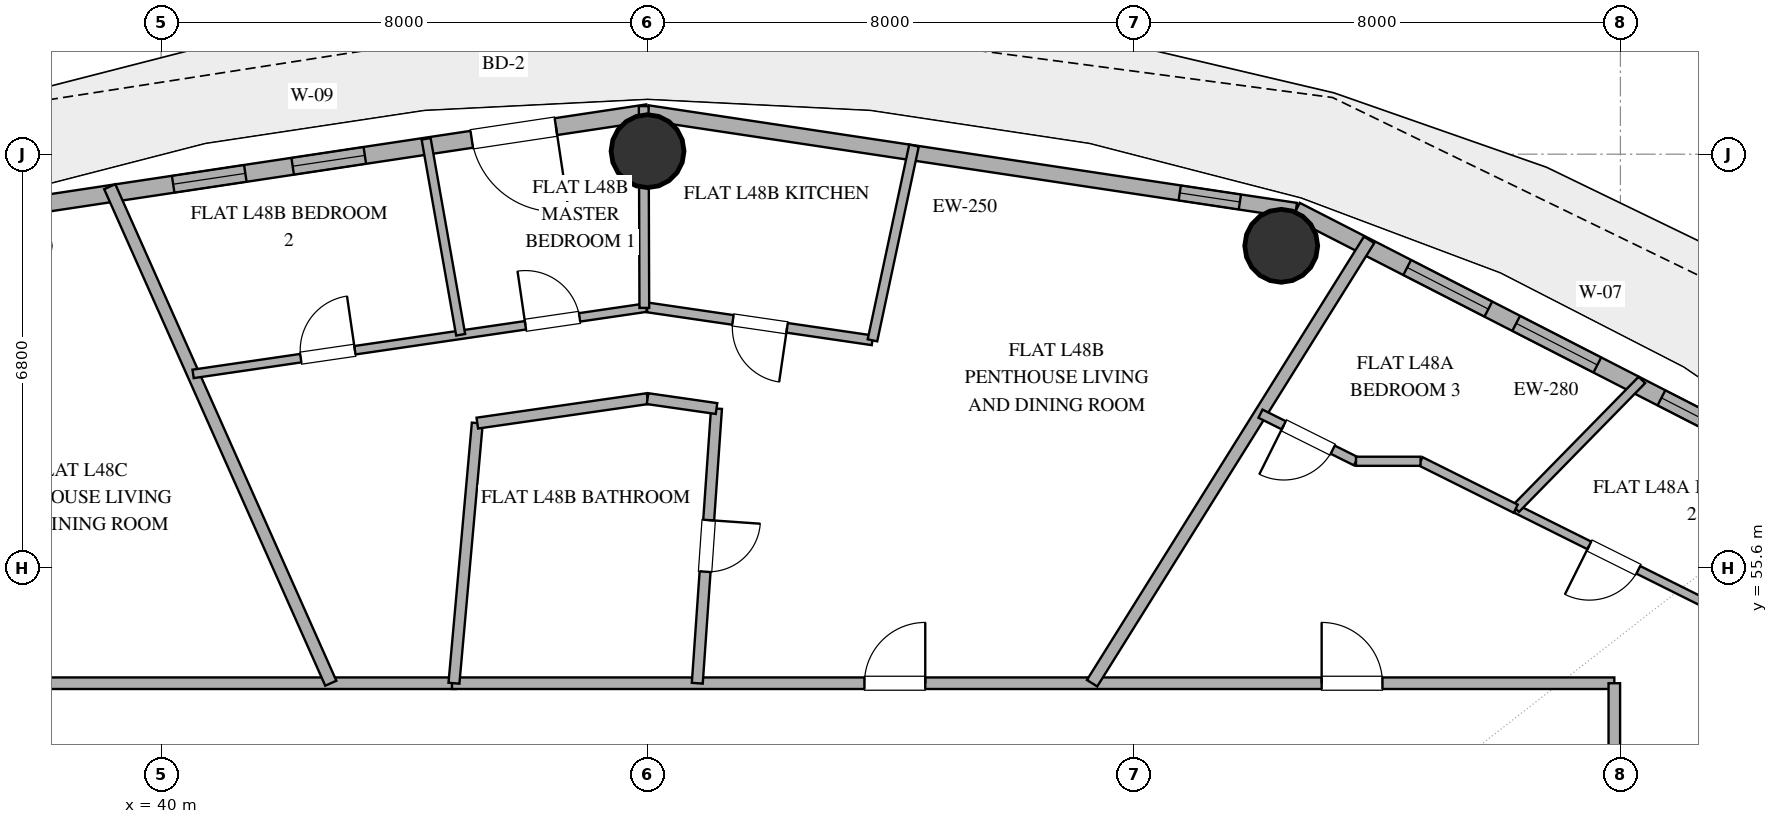
"""IFC4 building model, lengths in metres.
Left out: names, types, materials, properties, quantities, classifications, styles, units other than length and angle.
Written with IfcOpenShell. Run it as: python <this file> out.ifc"""

import sys

from ifc_helpers import new_model, si_unit, direction, frame, frame_2d, origin, origin_2d, place, context, subcontext, project, spatial, rectangle, hollow_circle, extrude, element, fill, save


model = new_model("IFC4")
c1 = context("Model", 3, precision=1e-05, world=origin(), true_north=direction((0.0, 1.0)))
c2 = subcontext(c1, "Body", "Model", "MODEL_VIEW")
j1 = project(units=[si_unit("LENGTHUNIT", "METRE"), si_unit("PLANEANGLEUNIT", "RADIAN")], contexts=[c1])
p1 = place(None, origin())
s1 = spatial("IfcSite", under=j1, at=p1, CompositionType="ELEMENT")
p2 = place(p1, origin())
s2 = spatial("IfcBuilding", under=s1, at=p2, CompositionType="ELEMENT")
p3 = place(p2, frame((0.0, 0.0, 190.2)))
s3 = spatial("IfcBuildingStorey", under=s2, at=p3, CompositionType="ELEMENT", Elevation=190.2)
for number, where, z_axis, x_axis in (
    (1, (58.422, 60.893, 0.0), (0.0, 0.0, 1.0), (1.0, 0.0, 0.0)),
    (2, (48.0, 62.45, 0.0), (0.0, 0.0, 1.0), (1.0, 0.0, 0.0)),
):
    element("IfcColumn", number, at=place(p3, frame(where, z_axis=z_axis, x_axis=x_axis)), inside=s3, PredefinedType="COLUMN", context=c2, shape_type="SweptSolid", body=[
        extrude(hollow_circle(Radius=0.6, WallThickness=0.032, at=origin_2d()), origin(), (0.0, 0.0, 1.0), 3.38),
    ])
p4 = place(p3, frame((67.576, 56.906, 0.0), z_axis=(0.0, 0.0, 1.0), x_axis=(-0.889872523182, 0.456209263919, 0.0)))
e3 = element("IfcWall", 3, at=p4, inside=s3, PredefinedType="SOLIDWALL", context=c2, shape_type="SweptSolid", body=[
    extrude(rectangle(XDim=10.016, YDim=0.28, at=frame_2d((5.008, 0.0))), origin(), (0.0, 0.0, 1.0), 3.38),
])
p5 = place(p4, frame((1.76, 0.0, 0.85)))
e4 = element("IfcOpeningElement", 4, at=p5, cuts=e3, PredefinedType="OPENING", context=c2, shape_type="SweptSolid", body=[
    extrude(rectangle(XDim=1.5, YDim=2.0, at=frame_2d((0.75, 1.0))), frame((0.0, 0.15, 0.0), z_axis=(0.0, -1.0, 0.0), x_axis=(1.0, 0.0, 0.0)), (0.0, 0.0, 1.0), 0.3),
])
p6 = place(p4, frame((4.445, 0.0, 0.85)))
e5 = element("IfcOpeningElement", 5, at=p6, cuts=e3, PredefinedType="OPENING", context=c2, shape_type="SweptSolid", body=[
    extrude(rectangle(XDim=1.5, YDim=1.8, at=frame_2d((0.75, 0.9))), frame((0.0, 0.15, 0.0), z_axis=(0.0, -1.0, 0.0), x_axis=(1.0, 0.0, 0.0)), (0.0, 0.0, 1.0), 0.3),
])
p7 = place(p4, frame((6.459, 0.0, 0.85)))
e6 = element("IfcOpeningElement", 6, at=p7, cuts=e3, PredefinedType="OPENING", context=c2, shape_type="SweptSolid", body=[
    extrude(rectangle(XDim=1.5, YDim=1.8, at=frame_2d((0.75, 0.9))), frame((0.0, 0.15, 0.0), z_axis=(0.0, -1.0, 0.0), x_axis=(1.0, 0.0, 0.0)), (0.0, 0.0, 1.0), 0.3),
])
p8 = place(p3, frame((58.663, 61.475, 0.0), z_axis=(0.0, 0.0, 1.0), x_axis=(-0.988863993413, 0.148822049884, 0.0)))
e7 = element("IfcWall", 7, at=p8, inside=s3, PredefinedType="SOLIDWALL", context=c2, shape_type="SweptSolid", body=[
    extrude(rectangle(XDim=10.783, YDim=0.25, at=frame_2d((5.392, 0.0))), origin(), (0.0, 0.0, 1.0), 3.38),
])
p9 = place(p8, frame((0.932, 0.0, 1.42)))
e8 = element("IfcOpeningElement", 8, at=p9, cuts=e7, PredefinedType="OPENING", context=c2, shape_type="SweptSolid", body=[
    extrude(rectangle(XDim=1.0, YDim=1.05, at=frame_2d((0.5, 0.525))), frame((0.0, 0.135, 0.0), z_axis=(0.0, -1.0, 0.0), x_axis=(1.0, 0.0, 0.0)), (0.0, 0.0, 1.0), 0.27),
])
p10 = place(p3, frame((48.0, 63.08, 0.0), z_axis=(0.0, 0.0, 1.0), x_axis=(-0.988863993413, -0.148822049884, 0.0)))
e9 = element("IfcWall", 9, at=p10, inside=s3, PredefinedType="SOLIDWALL", context=c2, shape_type="SweptSolid", body=[
    extrude(rectangle(XDim=10.783, YDim=0.28, at=frame_2d((5.392, 0.0))), origin(), (0.0, 0.0, 1.0), 3.38),
])
p11 = place(p10, frame((1.524, 0.0, 0.0)))
e10 = element("IfcOpeningElement", 10, at=p11, cuts=e9, PredefinedType="OPENING", context=c2, shape_type="SweptSolid", body=[
    extrude(rectangle(XDim=1.4, YDim=2.2, at=frame_2d((0.7, 1.1))), frame((0.0, 0.15, 0.0), z_axis=(0.0, -1.0, 0.0), x_axis=(1.0, 0.0, 0.0)), (0.0, 0.0, 1.0), 0.3),
])
p12 = place(p10, frame((4.702, 0.0, 0.85)))
e11 = element("IfcOpeningElement", 11, at=p12, cuts=e9, PredefinedType="OPENING", context=c2, shape_type="SweptSolid", body=[
    extrude(rectangle(XDim=1.2, YDim=1.8, at=frame_2d((0.6, 0.9))), frame((0.0, 0.15, 0.0), z_axis=(0.0, -1.0, 0.0), x_axis=(1.0, 0.0, 0.0)), (0.0, 0.0, 1.0), 0.3),
])
p13 = place(p10, frame((6.69, 0.0, 0.85)))
e12 = element("IfcOpeningElement", 12, at=p13, cuts=e9, PredefinedType="OPENING", context=c2, shape_type="SweptSolid", body=[
    extrude(rectangle(XDim=1.2, YDim=1.8, at=frame_2d((0.6, 0.9))), frame((0.0, 0.15, 0.0), z_axis=(0.0, -1.0, 0.0), x_axis=(1.0, 0.0, 0.0)), (0.0, 0.0, 1.0), 0.3),
])
p14 = place(p3, frame((32.1, 53.7, 0.0), z_axis=(0.0, 0.0, 1.0), x_axis=(1.0, 0.0, 0.0)))
e13 = element("IfcWall", 13, at=p14, inside=s3, PredefinedType="PARTITIONING", context=c2, shape_type="SweptSolid", body=[
    extrude(rectangle(XDim=12.748, YDim=0.19, at=frame_2d((6.374, 0.0))), origin(), (0.0, 0.0, 1.0), 2.74),
])
p15 = place(p14, frame((4.863, 0.0, 0.0)))
e14 = element("IfcOpeningElement", 14, at=p15, cuts=e13, PredefinedType="OPENING", context=c2, shape_type="SweptSolid", body=[
    extrude(rectangle(XDim=1.0, YDim=2.2, at=frame_2d((0.5, 1.1))), frame((0.0, 0.105, 0.0), z_axis=(0.0, -1.0, 0.0), x_axis=(1.0, 0.0, 0.0)), (0.0, 0.0, 1.0), 0.21),
])
p16 = place(p3, frame((44.784, 53.7, 0.0), z_axis=(0.0, 0.0, 1.0), x_axis=(1.0, 0.0, 0.0)))
e15 = element("IfcWall", 15, at=p16, inside=s3, PredefinedType="PARTITIONING", context=c2, shape_type="SweptSolid", body=[
    extrude(rectangle(XDim=19.116, YDim=0.19, at=frame_2d((9.558, 0.0))), origin(), (0.0, 0.0, 1.0), 2.74),
])
p17 = place(p16, frame((14.302, 0.0, 0.0)))
e16 = element("IfcOpeningElement", 16, at=p17, cuts=e15, PredefinedType="OPENING", context=c2, shape_type="SweptSolid", body=[
    extrude(rectangle(XDim=1.0, YDim=2.2, at=frame_2d((0.5, 1.1))), frame((0.0, 0.105, 0.0), z_axis=(0.0, -1.0, 0.0), x_axis=(1.0, 0.0, 0.0)), (0.0, 0.0, 1.0), 0.21),
])
p18 = place(p16, frame((6.783, 0.0, 0.0)))
e17 = element("IfcOpeningElement", 17, at=p18, cuts=e15, PredefinedType="OPENING", context=c2, shape_type="SweptSolid", body=[
    extrude(rectangle(XDim=1.0, YDim=2.2, at=frame_2d((0.5, 1.1))), frame((0.0, 0.105, 0.0), z_axis=(0.0, -1.0, 0.0), x_axis=(1.0, 0.0, 0.0)), (0.0, 0.0, 1.0), 0.21),
])
p19 = place(p3, frame((63.9, 53.7, 0.0), z_axis=(0.0, 0.0, 1.0), x_axis=(0.0, -1.0, 0.0)))
e18 = element("IfcWall", 18, at=p19, inside=s3, PredefinedType="PARTITIONING", context=c2, shape_type="SweptSolid", body=[
    extrude(rectangle(XDim=6.931, YDim=0.19, at=frame_2d((3.465, 0.0))), origin(), (0.0, 0.0, 1.0), 2.74),
])
p20 = place(p3, frame((42.791, 53.7, 0.0), z_axis=(0.0, 0.0, 1.0), x_axis=(-0.406736436421, 0.913545549651, 0.0)))
e19 = element("IfcWall", 19, at=p20, inside=s3, PredefinedType="PARTITIONING", context=c2, shape_type="SweptSolid", body=[
    extrude(rectangle(XDim=8.939, YDim=0.2, at=frame_2d((4.469, 0.0))), origin(), (0.0, 0.0, 1.0), 2.74),
])
p21 = place(p3, frame((55.311, 53.7, 0.0), z_axis=(0.0, 0.0, 1.0), x_axis=(0.529914717401, 0.848050937315, 0.0)))
e20 = element("IfcWall", 20, at=p21, inside=s3, PredefinedType="PARTITIONING", context=c2, shape_type="SweptSolid", body=[
    extrude(rectangle(XDim=8.599, YDim=0.2, at=frame_2d((4.299, 0.0))), origin(), (0.0, 0.0, 1.0), 2.74),
])
p22 = place(p3, frame((49.134, 58.217, 0.0), z_axis=(0.0, 0.0, 1.0), x_axis=(-0.069767962458, -0.997563246824, 0.0)))
e21 = element("IfcWall", 21, at=p22, inside=s3, PredefinedType="PLUMBINGWALL", context=c2, shape_type="SweptSolid", body=[
    extrude(rectangle(XDim=4.528, YDim=0.18, at=frame_2d((2.264, 0.0))), origin(), (0.0, 0.0, 1.0), 2.74),
])
p23 = place(p22, frame((1.839, 0.0, 0.0)))
e22 = element("IfcOpeningElement", 22, at=p23, cuts=e21, PredefinedType="OPENING", context=c2, shape_type="SweptSolid", body=[
    extrude(rectangle(XDim=0.85, YDim=2.1, at=frame_2d((0.425, 1.05))), frame((0.0, 0.1, 0.0), z_axis=(0.0, -1.0, 0.0), x_axis=(1.0, 0.0, 0.0)), (0.0, 0.0, 1.0), 0.2),
])
p24 = place(p3, frame((40.526, 58.787, 0.0), z_axis=(0.0, 0.0, 1.0), x_axis=(0.989472726968, 0.144719461672, 0.0)))
e23 = element("IfcWall", 23, at=p24, inside=s3, PredefinedType="PARTITIONING", context=c2, shape_type="SweptSolid", body=[
    extrude(rectangle(XDim=7.532, YDim=0.14, at=frame_2d((3.766, 0.0))), origin(), (0.0, 0.0, 1.0), 2.74),
])
p25 = place(p24, frame((1.79, 0.0, 0.0)))
e24 = element("IfcOpeningElement", 24, at=p25, cuts=e23, PredefinedType="OPENING", context=c2, shape_type="SweptSolid", body=[
    extrude(rectangle(XDim=0.9, YDim=2.1, at=frame_2d((0.45, 1.05))), frame((0.0, 0.08, 0.0), z_axis=(0.0, -1.0, 0.0), x_axis=(1.0, 0.0, 0.0)), (0.0, 0.0, 1.0), 0.16),
])
p26 = place(p24, frame((5.524, 0.0, 0.0)))
e25 = element("IfcOpeningElement", 25, at=p26, cuts=e23, PredefinedType="OPENING", context=c2, shape_type="SweptSolid", body=[
    extrude(rectangle(XDim=0.9, YDim=2.1, at=frame_2d((0.45, 1.05))), frame((0.0, 0.08, 0.0), z_axis=(0.0, -1.0, 0.0), x_axis=(1.0, 0.0, 0.0)), (0.0, 0.0, 1.0), 0.16),
])
p27 = place(p3, frame((44.816, 53.7, 0.0), z_axis=(0.0, 0.0, 1.0), x_axis=(0.089418344166, 0.995994156472, 0.0)))
e26 = element("IfcWall", 26, at=p27, inside=s3, PredefinedType="PLUMBINGWALL", context=c2, shape_type="SweptSolid", body=[
    extrude(rectangle(XDim=4.295, YDim=0.18, at=frame_2d((2.147, 0.0))), origin(), (0.0, 0.0, 1.0), 2.74),
])
p28 = place(p3, frame((51.699, 59.339, 0.0), z_axis=(0.0, 0.0, 1.0), x_axis=(-0.98948182168, 0.144657265858, 0.0)))
e27 = element("IfcWall", 27, at=p28, inside=s3, PredefinedType="PLUMBINGWALL", context=c2, shape_type="SweptSolid", body=[
    extrude(rectangle(XDim=3.738, YDim=0.16, at=frame_2d((1.869, 0.0))), origin(), (0.0, 0.0, 1.0), 2.74),
])
p29 = place(p28, frame((1.419, 0.0, 0.0)))
e28 = element("IfcOpeningElement", 28, at=p29, cuts=e27, PredefinedType="OPENING", context=c2, shape_type="SweptSolid", body=[
    extrude(rectangle(XDim=0.9, YDim=2.1, at=frame_2d((0.45, 1.05))), frame((0.0, 0.09, 0.0), z_axis=(0.0, -1.0, 0.0), x_axis=(1.0, 0.0, 0.0)), (0.0, 0.0, 1.0), 0.18),
])
p30 = place(p3, frame((65.505, 54.961, 0.0), z_axis=(0.0, 0.0, 1.0), x_axis=(-0.894941244144, 0.4461840086, 0.0)))
e29 = element("IfcWall", 29, at=p30, inside=s3, PredefinedType="PARTITIONING", context=c2, shape_type="SweptSolid", body=[
    extrude(rectangle(XDim=3.605, YDim=0.14, at=frame_2d((1.803, 0.0))), origin(), (0.0, 0.0, 1.0), 2.74),
])
p31 = place(p30, frame((1.353, 0.0, 0.0)))
e30 = element("IfcOpeningElement", 30, at=p31, cuts=e29, PredefinedType="OPENING", context=c2, shape_type="SweptSolid", body=[
    extrude(rectangle(XDim=0.9, YDim=2.1, at=frame_2d((0.45, 1.05))), frame((0.0, 0.08, 0.0), z_axis=(0.0, -1.0, 0.0), x_axis=(1.0, 0.0, 0.0)), (0.0, 0.0, 1.0), 0.16),
])
p32 = place(p3, frame((47.947, 59.872, 0.0), z_axis=(0.0, 0.0, 1.0), x_axis=(-0.003016466559, 0.999995450454, 0.0)))
e31 = element("IfcWall", 31, at=p32, inside=s3, PredefinedType="PLUMBINGWALL", context=c2, shape_type="SweptSolid", body=[
    extrude(rectangle(XDim=3.318, YDim=0.16, at=frame_2d((1.659, 0.0))), origin(), (0.0, 0.0, 1.0), 2.74),
])
p33 = place(p3, frame((52.382, 62.542, 0.0), z_axis=(0.0, 0.0, 1.0), x_axis=(-0.208602341862, -0.97800054344, 0.0)))
e32 = element("IfcWall", 32, at=p33, inside=s3, PredefinedType="PLUMBINGWALL", context=c2, shape_type="SweptSolid", body=[
    extrude(rectangle(XDim=3.275, YDim=0.16, at=frame_2d((1.637, 0.0))), origin(), (0.0, 0.0, 1.0), 2.74),
])
p34 = place(p3, frame((44.927, 59.43, 0.0), z_axis=(0.0, 0.0, 1.0), x_axis=(-0.17359807558, 0.984816586048, 0.0)))
e33 = element("IfcWall", 33, at=p34, inside=s3, PredefinedType="PARTITIONING", context=c2, shape_type="SweptSolid", body=[
    extrude(rectangle(XDim=3.273, YDim=0.15, at=frame_2d((1.636, 0.0))), origin(), (0.0, 0.0, 1.0), 2.74),
])
p35 = place(p3, frame((64.353, 58.687, 0.0), z_axis=(0.0, 0.0, 1.0), x_axis=(-0.699905055024, -0.714235895172, 0.0)))
e34 = element("IfcWall", 34, at=p35, inside=s3, PredefinedType="PARTITIONING", context=c2, shape_type="SweptSolid", body=[
    extrude(rectangle(XDim=2.964, YDim=0.15, at=frame_2d((1.482, 0.0))), origin(), (0.0, 0.0, 1.0), 2.74),
])
p36 = place(p3, frame((45.2, 57.978, 0.0), z_axis=(0.0, 0.0, 1.0), x_axis=(0.98983176764, 0.142243002535, 0.0)))
e35 = element("IfcWall", 35, at=p36, inside=s3, PredefinedType="PLUMBINGWALL", context=c2, shape_type="SweptSolid", body=[
    extrude(rectangle(XDim=2.829, YDim=0.18, at=frame_2d((1.414, 0.0))), origin(), (0.0, 0.0, 1.0), 2.74),
])
p37 = place(p3, frame((59.651, 57.35, 0.0), z_axis=(0.0, 0.0, 1.0), x_axis=(-0.895038630404, 0.445988621027, 0.0)))
e36 = element("IfcWall", 36, at=p37, inside=s3, PredefinedType="PARTITIONING", context=c2, shape_type="SweptSolid", body=[
    extrude(rectangle(XDim=1.754, YDim=0.15, at=frame_2d((0.877, 0.0))), origin(), (0.0, 0.0, 1.0), 2.74),
])
p38 = place(p37, frame((0.427, 0.0, 0.0)))
e37 = element("IfcOpeningElement", 37, at=p38, cuts=e36, PredefinedType="OPENING", context=c2, shape_type="SweptSolid", body=[
    extrude(rectangle(XDim=0.9, YDim=2.1, at=frame_2d((0.45, 1.05))), frame((0.0, 0.085, 0.0), z_axis=(0.0, -1.0, 0.0), x_axis=(1.0, 0.0, 0.0)), (0.0, 0.0, 1.0), 0.17),
])
p39 = place(p3, frame((62.278, 56.57, 0.0), z_axis=(0.0, 0.0, 1.0), x_axis=(-0.894929238491, 0.446208088333, 0.0)))
e38 = element("IfcWall", 38, at=p39, inside=s3, PredefinedType="PARTITIONING", context=c2, shape_type="SweptSolid", body=[
    extrude(rectangle(XDim=1.749, YDim=0.15, at=frame_2d((0.875, 0.0))), origin(), (0.0, 0.0, 1.0), 2.74),
])
p40 = place(p3, frame((48.0, 58.38, 0.0), z_axis=(0.0, 0.0, 1.0), x_axis=(0.989846946984, -0.142137333399, 0.0)))
e39 = element("IfcWall", 39, at=p40, inside=s3, PredefinedType="PLUMBINGWALL", context=c2, shape_type="SweptSolid", body=[
    extrude(rectangle(XDim=1.146, YDim=0.18, at=frame_2d((0.573, 0.0))), origin(), (0.0, 0.0, 1.0), 2.74),
])
p41 = place(p3, frame((60.713, 57.35, 0.0), z_axis=(0.0, 0.0, 1.0), x_axis=(-1.0, 0.0, 0.0)))
e40 = element("IfcWall", 40, at=p41, inside=s3, PredefinedType="PARTITIONING", context=c2, shape_type="SweptSolid", body=[
    extrude(rectangle(XDim=1.062, YDim=0.15, at=frame_2d((0.531, 0.0))), origin(), (0.0, 0.0, 1.0), 2.74),
])
p42 = place(p5, origin())
e41 = element("IfcWindow", 41, at=p42, inside=s3, PartitioningType="SINGLE_PANEL", PredefinedType="WINDOW", context=c2, shape_type="SweptSolid", body=[
    extrude(rectangle(XDim=1.5, YDim=2.0, at=frame_2d((0.75, 1.0))), frame((0.0, 0.03, 0.0), z_axis=(0.0, -1.0, 0.0), x_axis=(1.0, 0.0, 0.0)), (0.0, 0.0, 1.0), 0.06),
])
fill(e4, e41)
p43 = place(p6, origin())
e42 = element("IfcWindow", 42, at=p43, inside=s3, PartitioningType="SINGLE_PANEL", PredefinedType="WINDOW", context=c2, shape_type="SweptSolid", body=[
    extrude(rectangle(XDim=1.5, YDim=1.8, at=frame_2d((0.75, 0.9))), frame((0.0, 0.03, 0.0), z_axis=(0.0, -1.0, 0.0), x_axis=(1.0, 0.0, 0.0)), (0.0, 0.0, 1.0), 0.06),
])
fill(e5, e42)
p44 = place(p7, origin())
e43 = element("IfcWindow", 43, at=p44, inside=s3, PartitioningType="SINGLE_PANEL", PredefinedType="WINDOW", context=c2, shape_type="SweptSolid", body=[
    extrude(rectangle(XDim=1.5, YDim=1.8, at=frame_2d((0.75, 0.9))), frame((0.0, 0.03, 0.0), z_axis=(0.0, -1.0, 0.0), x_axis=(1.0, 0.0, 0.0)), (0.0, 0.0, 1.0), 0.06),
])
fill(e6, e43)
p45 = place(p11, origin())
e44 = element("IfcDoor", 44, at=p45, inside=s3, OperationType="SINGLE_SWING_LEFT", PredefinedType="DOOR", context=c2, shape_type="SweptSolid", body=[
    extrude(rectangle(XDim=1.4, YDim=2.2, at=frame_2d((0.7, 1.1))), frame((0.0, 0.025, 0.0), z_axis=(0.0, -1.0, 0.0), x_axis=(1.0, 0.0, 0.0)), (0.0, 0.0, 1.0), 0.05),
])
fill(e10, e44)
p46 = place(p12, origin())
e45 = element("IfcWindow", 45, at=p46, inside=s3, PartitioningType="SINGLE_PANEL", PredefinedType="WINDOW", context=c2, shape_type="SweptSolid", body=[
    extrude(rectangle(XDim=1.2, YDim=1.8, at=frame_2d((0.6, 0.9))), frame((0.0, 0.03, 0.0), z_axis=(0.0, -1.0, 0.0), x_axis=(1.0, 0.0, 0.0)), (0.0, 0.0, 1.0), 0.06),
])
fill(e11, e45)
p47 = place(p13, origin())
e46 = element("IfcWindow", 46, at=p47, inside=s3, PartitioningType="SINGLE_PANEL", PredefinedType="WINDOW", context=c2, shape_type="SweptSolid", body=[
    extrude(rectangle(XDim=1.2, YDim=1.8, at=frame_2d((0.6, 0.9))), frame((0.0, 0.03, 0.0), z_axis=(0.0, -1.0, 0.0), x_axis=(1.0, 0.0, 0.0)), (0.0, 0.0, 1.0), 0.06),
])
fill(e12, e46)
p48 = place(p9, origin())
e47 = element("IfcWindow", 47, at=p48, inside=s3, PartitioningType="SINGLE_PANEL", PredefinedType="WINDOW", context=c2, shape_type="SweptSolid", body=[
    extrude(rectangle(XDim=1.0, YDim=1.05, at=frame_2d((0.5, 0.525))), frame((0.0, 0.03, 0.0), z_axis=(0.0, -1.0, 0.0), x_axis=(1.0, 0.0, 0.0)), (0.0, 0.0, 1.0), 0.06),
])
fill(e8, e47)
p49 = place(p17, origin())
e48 = element("IfcDoor", 48, at=p49, inside=s3, OperationType="SINGLE_SWING_LEFT", PredefinedType="DOOR", context=c2, shape_type="SweptSolid", body=[
    extrude(rectangle(XDim=1.0, YDim=2.2, at=frame_2d((0.5, 1.1))), frame((0.0, 0.025, 0.0), z_axis=(0.0, -1.0, 0.0), x_axis=(1.0, 0.0, 0.0)), (0.0, 0.0, 1.0), 0.05),
])
fill(e16, e48)
p50 = place(p18, origin())
e49 = element("IfcDoor", 49, at=p50, inside=s3, OperationType="SINGLE_SWING_RIGHT", PredefinedType="DOOR", context=c2, shape_type="SweptSolid", body=[
    extrude(rectangle(XDim=1.0, YDim=2.2, at=frame_2d((0.5, 1.1))), frame((0.0, 0.025, 0.0), z_axis=(0.0, -1.0, 0.0), x_axis=(1.0, 0.0, 0.0)), (0.0, 0.0, 1.0), 0.05),
])
fill(e17, e49)
p51 = place(p23, origin())
e50 = element("IfcDoor", 50, at=p51, inside=s3, OperationType="SINGLE_SWING_LEFT", PredefinedType="DOOR", context=c2, shape_type="SweptSolid", body=[
    extrude(rectangle(XDim=0.85, YDim=2.1, at=frame_2d((0.425, 1.05))), frame((0.0, 0.025, 0.0), z_axis=(0.0, -1.0, 0.0), x_axis=(1.0, 0.0, 0.0)), (0.0, 0.0, 1.0), 0.05),
])
fill(e22, e50)
p52 = place(p25, origin())
e51 = element("IfcDoor", 51, at=p52, inside=s3, OperationType="SINGLE_SWING_RIGHT", PredefinedType="DOOR", context=c2, shape_type="SweptSolid", body=[
    extrude(rectangle(XDim=0.9, YDim=2.1, at=frame_2d((0.45, 1.05))), frame((0.0, 0.025, 0.0), z_axis=(0.0, -1.0, 0.0), x_axis=(1.0, 0.0, 0.0)), (0.0, 0.0, 1.0), 0.05),
])
fill(e24, e51)
p53 = place(p26, origin())
e52 = element("IfcDoor", 52, at=p53, inside=s3, OperationType="SINGLE_SWING_LEFT", PredefinedType="DOOR", context=c2, shape_type="SweptSolid", body=[
    extrude(rectangle(XDim=0.9, YDim=2.1, at=frame_2d((0.45, 1.05))), frame((0.0, 0.025, 0.0), z_axis=(0.0, -1.0, 0.0), x_axis=(1.0, 0.0, 0.0)), (0.0, 0.0, 1.0), 0.05),
])
fill(e25, e52)
p54 = place(p29, origin())
e53 = element("IfcDoor", 53, at=p54, inside=s3, OperationType="SINGLE_SWING_LEFT", PredefinedType="DOOR", context=c2, shape_type="SweptSolid", body=[
    extrude(rectangle(XDim=0.9, YDim=2.1, at=frame_2d((0.45, 1.05))), frame((0.0, 0.025, 0.0), z_axis=(0.0, -1.0, 0.0), x_axis=(1.0, 0.0, 0.0)), (0.0, 0.0, 1.0), 0.05),
])
fill(e28, e53)
p55 = place(p31, origin())
e54 = element("IfcDoor", 54, at=p55, inside=s3, OperationType="SINGLE_SWING_RIGHT", PredefinedType="DOOR", context=c2, shape_type="SweptSolid", body=[
    extrude(rectangle(XDim=0.9, YDim=2.1, at=frame_2d((0.45, 1.05))), frame((0.0, 0.025, 0.0), z_axis=(0.0, -1.0, 0.0), x_axis=(1.0, 0.0, 0.0)), (0.0, 0.0, 1.0), 0.05),
])
fill(e30, e54)
p56 = place(p38, origin())
e55 = element("IfcDoor", 55, at=p56, inside=s3, OperationType="SINGLE_SWING_RIGHT", PredefinedType="DOOR", context=c2, shape_type="SweptSolid", body=[
    extrude(rectangle(XDim=0.9, YDim=2.1, at=frame_2d((0.45, 1.05))), frame((0.0, 0.025, 0.0), z_axis=(0.0, -1.0, 0.0), x_axis=(1.0, 0.0, 0.0)), (0.0, 0.0, 1.0), 0.05),
])
fill(e37, e55)
save(model, sys.argv[1])
